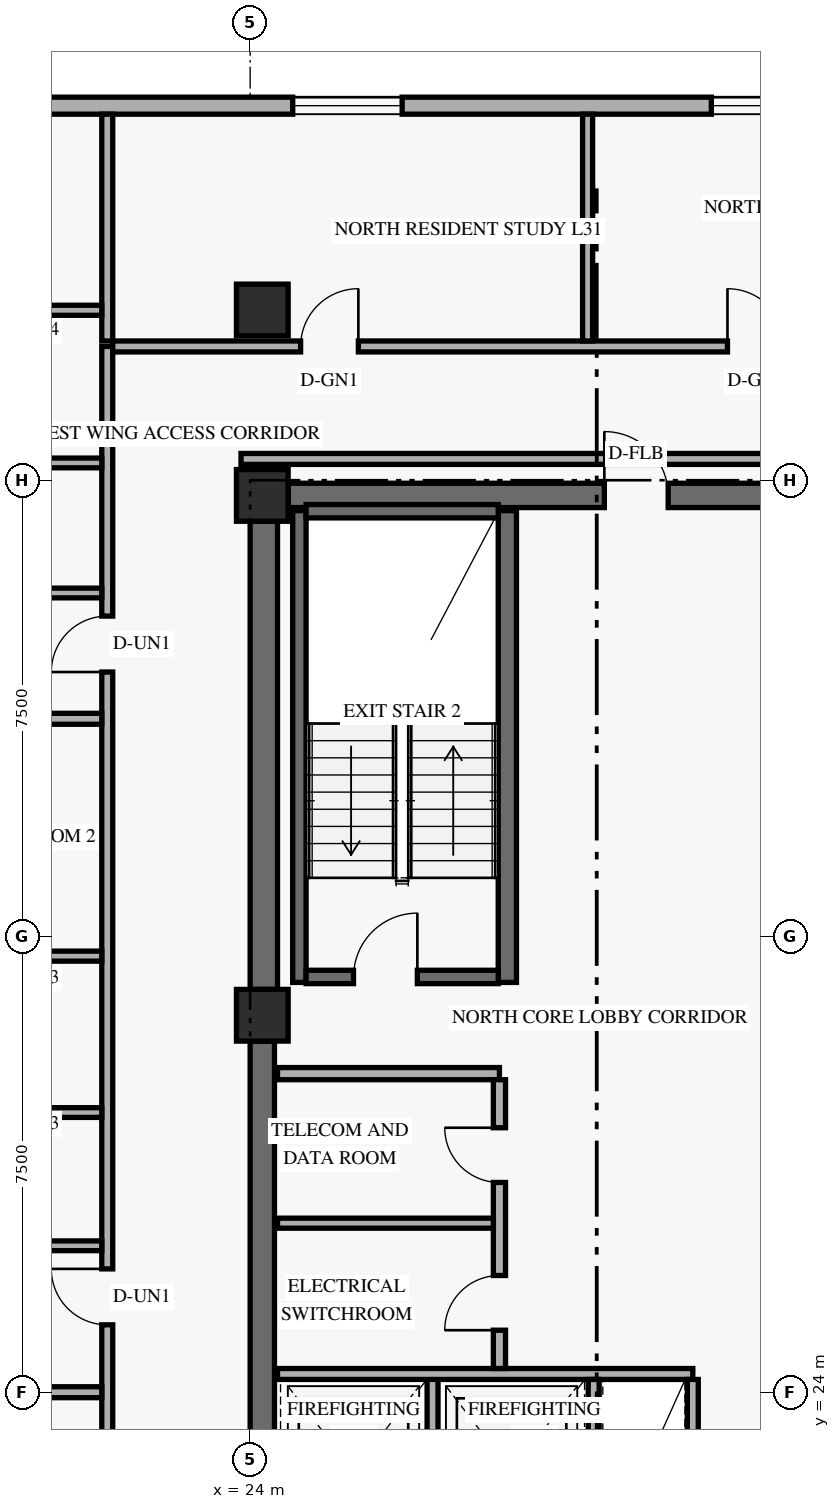
"""IFC4 building model, lengths in metres.
Left out: names, types, materials, properties, quantities, classifications, styles, units other than length and angle.
Written with IfcOpenShell. Run it as: python <this file> out.ifc"""

import sys

from ifc_helpers import new_model, si_unit, direction, frame, frame_2d, origin, origin_2d, place, context, subcontext, project, spatial, rectangle, extrude, element, fill, save


model = new_model("IFC4")
c1 = context("Model", 3, precision=1e-05, world=origin(), true_north=direction((0.0, 1.0)))
c2 = subcontext(c1, "Body", "Model", "MODEL_VIEW")
j1 = project(units=[si_unit("LENGTHUNIT", "METRE"), si_unit("PLANEANGLEUNIT", "RADIAN")], contexts=[c1])
p1 = place(None, origin())
s1 = spatial("IfcSite", under=j1, at=p1, CompositionType="ELEMENT")
p2 = place(p1, origin())
s2 = spatial("IfcBuilding", under=s1, at=p2, CompositionType="ELEMENT")
p3 = place(p2, frame((0.0, 0.0, 121.2)))
s3 = spatial("IfcBuildingStorey", under=s2, at=p3, CompositionType="ELEMENT", Elevation=121.2)
p4 = place(p3, frame((24.2, 17.975, 0.0), z_axis=(0.0, 0.0, 1.0), x_axis=(0.0, 1.0, 0.0)))
e1 = element("IfcWall", 1, at=p4, inside=s3, PredefinedType="SHEAR", context=c2, shape_type="SweptSolid", body=[
    extrude(rectangle(XDim=11.8, YDim=0.4, at=frame_2d((5.9, 0.0))), origin(), (0.0, 0.0, 1.0), 2.749),
])
p5 = place(p3, frame((24.225, 30.625, 0.0), z_axis=(0.0, 0.0, 1.0), x_axis=(0.0, 1.0, 0.0)))
e2 = element("IfcWall", 2, at=p5, inside=s3, PredefinedType="SHEAR", context=c2, shape_type="SweptSolid", body=[
    extrude(rectangle(XDim=7.7, YDim=0.45, at=frame_2d((3.85, 0.0))), origin(), (0.0, 0.0, 1.0), 2.749),
])
p6 = place(p3, frame((24.625, 38.75, 0.0), z_axis=(0.0, 0.0, 1.0), x_axis=(1.0, 0.0, 0.0)))
e3 = element("IfcWall", 3, at=p6, inside=s3, PredefinedType="SHEAR", context=c2, shape_type="SweptSolid", body=[
    extrude(rectangle(XDim=10.15, YDim=0.4, at=frame_2d((5.075, 0.0))), origin(), (0.0, 0.0, 1.0), 3.36),
])
p7 = place(p6, frame((5.2, 0.0, 0.0)))
e4 = element("IfcOpeningElement", 4, at=p7, cuts=e3, PredefinedType="OPENING", context=c2, shape_type="SweptSolid", body=[
    extrude(rectangle(XDim=1.05, YDim=2.15, at=frame_2d((0.525, 1.075))), frame((0.0, 0.21, 0.0), z_axis=(0.0, -1.0, 0.0), x_axis=(1.0, 0.0, 0.0)), (0.0, 0.0, 1.0), 0.42),
])
p8 = place(p3, frame((24.81, 30.74, 0.0), z_axis=(0.0, 0.0, 1.0), x_axis=(0.0, 1.0, 0.0)))
e5 = element("IfcWall", 5, at=p8, inside=s3, PredefinedType="SHEAR", context=c2, shape_type="SweptSolid", body=[
    extrude(rectangle(XDim=7.76, YDim=0.22, at=frame_2d((3.88, 0.0))), origin(), (0.0, 0.0, 1.0), 3.36),
])
p9 = place(p3, frame((28.23, 30.74, 0.0), z_axis=(0.0, 0.0, 1.0), x_axis=(0.0, 1.0, 0.0)))
e6 = element("IfcWall", 6, at=p9, inside=s3, PredefinedType="SHEAR", context=c2, shape_type="SweptSolid", body=[
    extrude(rectangle(XDim=7.76, YDim=0.3, at=frame_2d((3.88, 0.0))), origin(), (0.0, 0.0, 1.0), 3.36),
])
p10 = place(p3, frame((24.92, 30.83, 0.0), z_axis=(0.0, 0.0, 1.0), x_axis=(1.0, 0.0, 0.0)))
e7 = element("IfcWall", 7, at=p10, inside=s3, PredefinedType="SHEAR", context=c2, shape_type="SweptSolid", body=[
    extrude(rectangle(XDim=3.16, YDim=0.22, at=frame_2d((1.58, 0.0))), origin(), (0.0, 0.0, 1.0), 3.36),
])
p11 = place(p10, frame((0.78, 0.0, 0.0)))
e8 = element("IfcOpeningElement", 8, at=p11, cuts=e7, PredefinedType="OPENING", context=c2, shape_type="SweptSolid", body=[
    extrude(rectangle(XDim=1.05, YDim=2.15, at=frame_2d((0.525, 1.075))), frame((0.0, 0.12, 0.0), z_axis=(0.0, -1.0, 0.0), x_axis=(1.0, 0.0, 0.0)), (0.0, 0.0, 1.0), 0.24),
])
p12 = place(p3, frame((24.92, 38.49, 0.0), z_axis=(0.0, 0.0, 1.0), x_axis=(1.0, 0.0, 0.0)))
e9 = element("IfcWall", 9, at=p12, inside=s3, PredefinedType="SHEAR", context=c2, shape_type="SweptSolid", body=[
    extrude(rectangle(XDim=3.16, YDim=0.22, at=frame_2d((1.58, 0.0))), origin(), (0.0, 0.0, 1.0), 3.36),
])
for number, where, z_axis, x_axis in (
    (10, (24.2, 30.2, 0.0), (0.0, 0.0, 1.0), (1.0, 0.0, 0.0)),
    (11, (24.2, 38.75, 0.0), (0.0, 0.0, 1.0), (1.0, 0.0, 0.0)),
    (12, (24.2, 41.8, 0.0), (0.0, 0.0, 1.0), (1.0, 0.0, 0.0)),
):
    element("IfcColumn", number, at=place(p3, frame(where, z_axis=z_axis, x_axis=x_axis)), inside=s3, PredefinedType="COLUMN", context=c2, shape_type="SweptSolid", body=[
        extrude(rectangle(XDim=0.85, YDim=0.85, at=origin_2d()), origin(), (0.0, 0.0, 1.0), 3.6),
    ])
p13 = place(p3, frame((49.98, 45.16, 0.0), z_axis=(0.0, 0.0, 1.0), x_axis=(-1.0, 0.0, 0.0)))
e13 = element("IfcWall", 13, at=p13, inside=s3, PredefinedType="SOLIDWALL", context=c2, shape_type="SweptSolid", body=[
    extrude(rectangle(XDim=36.56, YDim=0.28, at=frame_2d((18.28, 0.0))), origin(), (0.0, 0.0, 1.0), 3.36),
])
p14 = place(p13, frame((31.545, 0.0, 0.85)))
e14 = element("IfcOpeningElement", 14, at=p14, cuts=e13, PredefinedType="OPENING", context=c2, shape_type="SweptSolid", body=[
    extrude(rectangle(XDim=1.8, YDim=1.6, at=frame_2d((0.9, 0.8))), frame((0.0, 0.15, 0.0), z_axis=(0.0, -1.0, 0.0), x_axis=(1.0, 0.0, 0.0)), (0.0, 0.0, 1.0), 0.3),
])
p15 = place(p13, frame((23.48, 0.0, 0.85)))
e15 = element("IfcOpeningElement", 15, at=p15, cuts=e13, PredefinedType="OPENING", context=c2, shape_type="SweptSolid", body=[
    extrude(rectangle(XDim=1.8, YDim=1.6, at=frame_2d((0.9, 0.8))), frame((0.0, 0.15, 0.0), z_axis=(0.0, -1.0, 0.0), x_axis=(1.0, 0.0, 0.0)), (0.0, 0.0, 1.0), 0.3),
])
p16 = place(p13, frame((16.595, 0.0, 0.85)))
e16 = element("IfcOpeningElement", 16, at=p16, cuts=e13, PredefinedType="OPENING", context=c2, shape_type="SweptSolid", body=[
    extrude(rectangle(XDim=1.8, YDim=1.6, at=frame_2d((0.9, 0.8))), frame((0.0, 0.15, 0.0), z_axis=(0.0, -1.0, 0.0), x_axis=(1.0, 0.0, 0.0)), (0.0, 0.0, 1.0), 0.3),
])
p17 = place(p13, frame((10.365, 0.0, 0.85)))
e17 = element("IfcOpeningElement", 17, at=p17, cuts=e13, PredefinedType="OPENING", context=c2, shape_type="SweptSolid", body=[
    extrude(rectangle(XDim=1.8, YDim=1.6, at=frame_2d((0.9, 0.8))), frame((0.0, 0.15, 0.0), z_axis=(0.0, -1.0, 0.0), x_axis=(1.0, 0.0, 0.0)), (0.0, 0.0, 1.0), 0.3),
])
p18 = place(p13, frame((4.575, 0.0, 0.85)))
e18 = element("IfcOpeningElement", 18, at=p18, cuts=e13, PredefinedType="OPENING", context=c2, shape_type="SweptSolid", body=[
    extrude(rectangle(XDim=1.8, YDim=1.6, at=frame_2d((0.9, 0.8))), frame((0.0, 0.15, 0.0), z_axis=(0.0, -1.0, 0.0), x_axis=(1.0, 0.0, 0.0)), (0.0, 0.0, 1.0), 0.3),
])
p19 = place(p13, frame((0.59, 0.0, 0.85)))
e19 = element("IfcOpeningElement", 19, at=p19, cuts=e13, PredefinedType="OPENING", context=c2, shape_type="SweptSolid", body=[
    extrude(rectangle(XDim=1.8, YDim=1.6, at=frame_2d((0.9, 0.8))), frame((0.0, 0.15, 0.0), z_axis=(0.0, -1.0, 0.0), x_axis=(1.0, 0.0, 0.0)), (0.0, 0.0, 1.0), 0.3),
])
p20 = place(p3, frame((27.0, 21.19, 0.0), z_axis=(0.0, 0.0, 1.0), x_axis=(0.0, 1.0, 0.0)))
e20 = element("IfcWall", 20, at=p20, inside=s3, PredefinedType="STANDARD", context=c2, shape_type="SweptSolid", body=[
    extrude(rectangle(XDim=3.11, YDim=0.18, at=frame_2d((1.555, 0.0))), origin(), (0.0, 0.0, 1.0), 3.36),
])
p21 = place(p3, frame((24.45, 24.3, 0.0), z_axis=(0.0, 0.0, 1.0), x_axis=(1.0, 0.0, 0.0)))
e21 = element("IfcWall", 21, at=p21, inside=s3, PredefinedType="STANDARD", context=c2, shape_type="SweptSolid", body=[
    extrude(rectangle(XDim=6.83, YDim=0.18, at=frame_2d((3.415, 0.0))), origin(), (0.0, 0.0, 1.0), 3.36),
])
for number, where, z_axis, x_axis in (
    (22, (29.65, 21.19, 0.0), (0.0, 0.0, 1.0), (0.0, 1.0, 0.0)),
    (23, (31.28, 21.19, 0.0), (0.0, 0.0, 1.0), (0.0, 1.0, 0.0)),
):
    element("IfcWall", number, at=place(p3, frame(where, z_axis=z_axis, x_axis=x_axis)), inside=s3, PredefinedType="STANDARD", context=c2, shape_type="SweptSolid", body=[
        extrude(rectangle(XDim=3.02, YDim=0.18, at=frame_2d((1.51, 0.0))), origin(), (0.0, 0.0, 1.0), 3.36),
    ])
p22 = place(p3, frame((24.45, 29.24, 0.0), z_axis=(0.0, 0.0, 1.0), x_axis=(1.0, 0.0, 0.0)))
e24 = element("IfcWall", 24, at=p22, inside=s3, PredefinedType="STANDARD", context=c2, shape_type="SweptSolid", body=[
    extrude(rectangle(XDim=3.65, YDim=0.2, at=frame_2d((1.825, 0.0))), origin(), (0.0, 0.0, 1.0), 3.36),
])
p23 = place(p3, frame((28.1, 24.39, 0.0), z_axis=(0.0, 0.0, 1.0), x_axis=(0.0, 1.0, 0.0)))
e25 = element("IfcWall", 25, at=p23, inside=s3, PredefinedType="STANDARD", context=c2, shape_type="SweptSolid", body=[
    extrude(rectangle(XDim=4.75, YDim=0.2, at=frame_2d((2.375, 0.0))), origin(), (0.0, 0.0, 1.0), 3.36),
])
p24 = place(p23, frame((0.63, 0.0, 0.0)))
e26 = element("IfcOpeningElement", 26, at=p24, cuts=e25, PredefinedType="OPENING", context=c2, shape_type="SweptSolid", body=[
    extrude(rectangle(XDim=0.9, YDim=2.1, at=frame_2d((0.45, 1.05))), frame((0.0, 0.11, 0.0), z_axis=(0.0, -1.0, 0.0), x_axis=(1.0, 0.0, 0.0)), (0.0, 0.0, 1.0), 0.22),
])
p25 = place(p23, frame((3.06, 0.0, 0.0)))
e27 = element("IfcOpeningElement", 27, at=p25, cuts=e25, PredefinedType="OPENING", context=c2, shape_type="SweptSolid", body=[
    extrude(rectangle(XDim=0.9, YDim=2.1, at=frame_2d((0.45, 1.05))), frame((0.0, 0.11, 0.0), z_axis=(0.0, -1.0, 0.0), x_axis=(1.0, 0.0, 0.0)), (0.0, 0.0, 1.0), 0.22),
])
p26 = place(p3, frame((24.45, 26.78, 0.0), z_axis=(0.0, 0.0, 1.0), x_axis=(1.0, 0.0, 0.0)))
e28 = element("IfcWall", 28, at=p26, inside=s3, PredefinedType="PARTITIONING", context=c2, shape_type="SweptSolid", body=[
    extrude(rectangle(XDim=3.55, YDim=0.165, at=frame_2d((1.775, 0.0))), origin(), (0.0, 0.0, 1.0), 3.36),
])
p27 = place(p3, frame((21.65, 6.8, 0.0), z_axis=(0.0, 0.0, 1.0), x_axis=(0.0, 1.0, 0.0)))
e29 = element("IfcWall", 29, at=p27, inside=s3, PredefinedType="STANDARD", context=c2, shape_type="SweptSolid", body=[
    extrude(rectangle(XDim=34.4, YDim=0.18, at=frame_2d((17.2, 0.0))), origin(), (0.0, 0.0, 1.0), 2.731),
])
p28 = place(p27, frame((4.472, 0.0, 0.0)))
e30 = element("IfcOpeningElement", 30, at=p28, cuts=e29, PredefinedType="OPENING", context=c2, shape_type="SweptSolid", body=[
    extrude(rectangle(XDim=0.92, YDim=2.15, at=frame_2d((0.46, 1.075))), frame((0.0, 0.1, 0.0), z_axis=(0.0, -1.0, 0.0), x_axis=(1.0, 0.0, 0.0)), (0.0, 0.0, 1.0), 0.2),
])
p29 = place(p27, frame((7.261, 0.0, 0.0)))
e31 = element("IfcOpeningElement", 31, at=p29, cuts=e29, PredefinedType="OPENING", context=c2, shape_type="SweptSolid", body=[
    extrude(rectangle(XDim=0.92, YDim=2.15, at=frame_2d((0.46, 1.075))), frame((0.0, 0.1, 0.0), z_axis=(0.0, -1.0, 0.0), x_axis=(1.0, 0.0, 0.0)), (0.0, 0.0, 1.0), 0.2),
])
p30 = place(p27, frame((18.308, 0.0, 0.0)))
e32 = element("IfcOpeningElement", 32, at=p30, cuts=e29, PredefinedType="OPENING", context=c2, shape_type="SweptSolid", body=[
    extrude(rectangle(XDim=0.92, YDim=2.15, at=frame_2d((0.46, 1.075))), frame((0.0, 0.1, 0.0), z_axis=(0.0, -1.0, 0.0), x_axis=(1.0, 0.0, 0.0)), (0.0, 0.0, 1.0), 0.2),
])
p31 = place(p27, frame((29.045, 0.0, 0.0)))
e33 = element("IfcOpeningElement", 33, at=p31, cuts=e29, PredefinedType="OPENING", context=c2, shape_type="SweptSolid", body=[
    extrude(rectangle(XDim=0.92, YDim=2.15, at=frame_2d((0.46, 1.075))), frame((0.0, 0.1, 0.0), z_axis=(0.0, -1.0, 0.0), x_axis=(1.0, 0.0, 0.0)), (0.0, 0.0, 1.0), 0.2),
])
p32 = place(p3, frame((21.74, 41.2, 0.0), z_axis=(0.0, 0.0, 1.0), x_axis=(1.0, 0.0, 0.0)))
e34 = element("IfcWall", 34, at=p32, inside=s3, PredefinedType="STANDARD", context=c2, shape_type="SweptSolid", body=[
    extrude(rectangle(XDim=13.68, YDim=0.18, at=frame_2d((6.84, 0.0))), origin(), (0.0, 0.0, 1.0), 2.731),
])
p33 = place(p32, frame((3.09, 0.0, 0.0)))
e35 = element("IfcOpeningElement", 35, at=p33, cuts=e34, PredefinedType="OPENING", context=c2, shape_type="SweptSolid", body=[
    extrude(rectangle(XDim=0.95, YDim=2.15, at=frame_2d((0.475, 1.075))), frame((0.0, 0.1, 0.0), z_axis=(0.0, -1.0, 0.0), x_axis=(1.0, 0.0, 0.0)), (0.0, 0.0, 1.0), 0.2),
])
p34 = place(p32, frame((10.11, 0.0, 0.0)))
e36 = element("IfcOpeningElement", 36, at=p34, cuts=e34, PredefinedType="OPENING", context=c2, shape_type="SweptSolid", body=[
    extrude(rectangle(XDim=0.95, YDim=2.15, at=frame_2d((0.475, 1.075))), frame((0.0, 0.1, 0.0), z_axis=(0.0, -1.0, 0.0), x_axis=(1.0, 0.0, 0.0)), (0.0, 0.0, 1.0), 0.2),
])
p35 = place(p3, frame((23.85, 39.35, 0.0), z_axis=(0.0, 0.0, 1.0), x_axis=(1.0, 0.0, 0.0)))
e37 = element("IfcWall", 37, at=p35, inside=s3, PredefinedType="STANDARD", context=c2, shape_type="SweptSolid", body=[
    extrude(rectangle(XDim=11.57, YDim=0.18, at=frame_2d((5.785, 0.0))), origin(), (0.0, 0.0, 1.0), 2.731),
])
p36 = place(p3, frame((21.65, 41.29, 0.0), z_axis=(0.0, 0.0, 1.0), x_axis=(0.0, 1.0, 0.0)))
e38 = element("IfcWall", 38, at=p36, inside=s3, PredefinedType="PARTITIONING", context=c2, shape_type="SweptSolid", body=[
    extrude(rectangle(XDim=3.73, YDim=0.18, at=frame_2d((1.865, 0.0))), origin(), (0.0, 0.0, 1.0), 2.809),
])
p37 = place(p3, frame((10.08, 24.0, 0.0), z_axis=(0.0, 0.0, 1.0), x_axis=(1.0, 0.0, 0.0)))
e39 = element("IfcWall", 39, at=p37, inside=s3, PredefinedType="PARTITIONING", context=c2, shape_type="SweptSolid", body=[
    extrude(rectangle(XDim=11.48, YDim=0.18, at=frame_2d((5.74, 0.0))), origin(), (0.0, 0.0, 1.0), 2.731),
])
p38 = place(p3, frame((10.08, 31.172, 0.0), z_axis=(0.0, 0.0, 1.0), x_axis=(1.0, 0.0, 0.0)))
e40 = element("IfcWall", 40, at=p38, inside=s3, PredefinedType="PARTITIONING", context=c2, shape_type="SweptSolid", body=[
    extrude(rectangle(XDim=11.48, YDim=0.165, at=frame_2d((5.74, 0.0))), origin(), (0.0, 0.0, 1.0), 2.731),
])
p39 = place(p38, frame((1.75, 0.0, 0.0)))
e41 = element("IfcOpeningElement", 41, at=p39, cuts=e40, PredefinedType="OPENING", context=c2, shape_type="SweptSolid", body=[
    extrude(rectangle(XDim=0.88, YDim=2.14, at=frame_2d((0.44, 1.07))), frame((0.0, 0.093, 0.0), z_axis=(0.0, -1.0, 0.0), x_axis=(1.0, 0.0, 0.0)), (0.0, 0.0, 1.0), 0.185),
])
p40 = place(p38, frame((4.87, 0.0, 0.0)))
e42 = element("IfcOpeningElement", 42, at=p40, cuts=e40, PredefinedType="OPENING", context=c2, shape_type="SweptSolid", body=[
    extrude(rectangle(XDim=0.88, YDim=2.14, at=frame_2d((0.44, 1.07))), frame((0.0, 0.093, 0.0), z_axis=(0.0, -1.0, 0.0), x_axis=(1.0, 0.0, 0.0)), (0.0, 0.0, 1.0), 0.185),
])
p41 = place(p3, frame((16.03, 26.408, 0.0), z_axis=(0.0, 0.0, 1.0), x_axis=(1.0, 0.0, 0.0)))
e43 = element("IfcWall", 43, at=p41, inside=s3, PredefinedType="PLUMBINGWALL", context=c2, shape_type="SweptSolid", body=[
    extrude(rectangle(XDim=5.53, YDim=0.16, at=frame_2d((2.765, 0.0))), origin(), (0.0, 0.0, 1.0), 2.731),
])
p42 = place(p3, frame((16.19, 28.6, 0.0), z_axis=(0.0, 0.0, 1.0), x_axis=(1.0, 0.0, 0.0)))
e44 = element("IfcWall", 44, at=p42, inside=s3, PredefinedType="PLUMBINGWALL", context=c2, shape_type="SweptSolid", body=[
    extrude(rectangle(XDim=5.37, YDim=0.16, at=frame_2d((2.685, 0.0))), origin(), (0.0, 0.0, 1.0), 2.731),
])
p43 = place(p3, frame((10.08, 35.076, 0.0), z_axis=(0.0, 0.0, 1.0), x_axis=(1.0, 0.0, 0.0)))
e45 = element("IfcWall", 45, at=p43, inside=s3, PredefinedType="PARTITIONING", context=c2, shape_type="SweptSolid", body=[
    extrude(rectangle(XDim=11.48, YDim=0.18, at=frame_2d((5.74, 0.0))), origin(), (0.0, 0.0, 1.0), 2.731),
])
p44 = place(p3, frame((10.099, 41.795, 0.0), z_axis=(0.0, 0.0, 1.0), x_axis=(1.0, 0.0, 0.0)))
e46 = element("IfcWall", 46, at=p44, inside=s3, PredefinedType="PARTITIONING", context=c2, shape_type="SweptSolid", body=[
    extrude(rectangle(XDim=11.461, YDim=0.165, at=frame_2d((5.73, 0.0))), origin(), (0.0, 0.0, 1.0), 2.809),
])
p45 = place(p44, frame((2.391, 0.0, 0.0)))
e47 = element("IfcOpeningElement", 47, at=p45, cuts=e46, PredefinedType="OPENING", context=c2, shape_type="SweptSolid", body=[
    extrude(rectangle(XDim=0.9, YDim=2.14, at=frame_2d((0.45, 1.07))), frame((0.0, 0.093, 0.0), z_axis=(0.0, -1.0, 0.0), x_axis=(1.0, 0.0, 0.0)), (0.0, 0.0, 1.0), 0.185),
])
p46 = place(p3, frame((16.03, 37.145, 0.0), z_axis=(0.0, 0.0, 1.0), x_axis=(1.0, 0.0, 0.0)))
e48 = element("IfcWall", 48, at=p46, inside=s3, PredefinedType="PLUMBINGWALL", context=c2, shape_type="SweptSolid", body=[
    extrude(rectangle(XDim=5.53, YDim=0.16, at=frame_2d((2.765, 0.0))), origin(), (0.0, 0.0, 1.0), 2.731),
])
p47 = place(p3, frame((16.19, 39.284, 0.0), z_axis=(0.0, 0.0, 1.0), x_axis=(1.0, 0.0, 0.0)))
e49 = element("IfcWall", 49, at=p47, inside=s3, PredefinedType="PLUMBINGWALL", context=c2, shape_type="SweptSolid", body=[
    extrude(rectangle(XDim=5.37, YDim=0.16, at=frame_2d((2.685, 0.0))), origin(), (0.0, 0.0, 1.0), 2.731),
])
p48 = place(p3, frame((29.55, 41.29, 0.0), z_axis=(0.0, 0.0, 1.0), x_axis=(0.0, 1.0, 0.0)))
e50 = element("IfcWall", 50, at=p48, inside=s3, PredefinedType="PARTITIONING", context=c2, shape_type="SweptSolid", body=[
    extrude(rectangle(XDim=3.73, YDim=0.165, at=frame_2d((1.865, 0.0))), origin(), (0.0, 0.0, 1.0), 2.809),
])
p49 = place(p15, origin())
e51 = element("IfcWindow", 51, at=p49, inside=s3, PartitioningType="SINGLE_PANEL", PredefinedType="WINDOW", context=c2, shape_type="SweptSolid", body=[
    extrude(rectangle(XDim=1.8, YDim=1.6, at=frame_2d((0.9, 0.8))), frame((0.0, 0.03, 0.0), z_axis=(0.0, -1.0, 0.0), x_axis=(1.0, 0.0, 0.0)), (0.0, 0.0, 1.0), 0.06),
])
fill(e15, e51)
p50 = place(p16, origin())
e52 = element("IfcWindow", 52, at=p50, inside=s3, PartitioningType="SINGLE_PANEL", PredefinedType="WINDOW", context=c2, shape_type="SweptSolid", body=[
    extrude(rectangle(XDim=1.8, YDim=1.6, at=frame_2d((0.9, 0.8))), frame((0.0, 0.03, 0.0), z_axis=(0.0, -1.0, 0.0), x_axis=(1.0, 0.0, 0.0)), (0.0, 0.0, 1.0), 0.06),
])
fill(e16, e52)
p51 = place(p11, origin())
e53 = element("IfcDoor", 53, at=p51, inside=s3, OperationType="SINGLE_SWING_RIGHT", PredefinedType="DOOR", context=c2, shape_type="SweptSolid", body=[
    extrude(rectangle(XDim=1.05, YDim=2.15, at=frame_2d((0.525, 1.075))), frame((0.0, 0.025, 0.0), z_axis=(0.0, -1.0, 0.0), x_axis=(1.0, 0.0, 0.0)), (0.0, 0.0, 1.0), 0.05),
])
fill(e8, e53)
p52 = place(p24, origin())
e54 = element("IfcDoor", 54, at=p52, inside=s3, OperationType="SINGLE_SWING_LEFT", PredefinedType="DOOR", context=c2, shape_type="SweptSolid", body=[
    extrude(rectangle(XDim=0.9, YDim=2.1, at=frame_2d((0.45, 1.05))), frame((0.0, 0.025, 0.0), z_axis=(0.0, -1.0, 0.0), x_axis=(1.0, 0.0, 0.0)), (0.0, 0.0, 1.0), 0.05),
])
fill(e26, e54)
p53 = place(p25, origin())
e55 = element("IfcDoor", 55, at=p53, inside=s3, OperationType="SINGLE_SWING_RIGHT", PredefinedType="DOOR", context=c2, shape_type="SweptSolid", body=[
    extrude(rectangle(XDim=0.9, YDim=2.1, at=frame_2d((0.45, 1.05))), frame((0.0, 0.025, 0.0), z_axis=(0.0, -1.0, 0.0), x_axis=(1.0, 0.0, 0.0)), (0.0, 0.0, 1.0), 0.05),
])
fill(e27, e55)
p54 = place(p7, frame((1.05, 0.0, 0.0), z_axis=(0.0, 0.0, 1.0), x_axis=(-1.0, 0.0, 0.0)))
e56 = element("IfcDoor", 56, at=p54, inside=s3, OperationType="SINGLE_SWING_RIGHT", PredefinedType="DOOR", context=c2, shape_type="SweptSolid", body=[
    extrude(rectangle(XDim=1.05, YDim=2.15, at=frame_2d((0.525, 1.075))), frame((0.0, 0.025, 0.0), z_axis=(0.0, -1.0, 0.0), x_axis=(1.0, 0.0, 0.0)), (0.0, 0.0, 1.0), 0.05),
])
fill(e4, e56)
p55 = place(p30, origin())
e57 = element("IfcDoor", 57, at=p55, inside=s3, OperationType="SINGLE_SWING_RIGHT", PredefinedType="DOOR", context=c2, shape_type="SweptSolid", body=[
    extrude(rectangle(XDim=0.92, YDim=2.15, at=frame_2d((0.46, 1.075))), frame((0.0, 0.025, 0.0), z_axis=(0.0, -1.0, 0.0), x_axis=(1.0, 0.0, 0.0)), (0.0, 0.0, 1.0), 0.05),
])
fill(e32, e57)
p56 = place(p31, origin())
e58 = element("IfcDoor", 58, at=p56, inside=s3, OperationType="SINGLE_SWING_LEFT", PredefinedType="DOOR", context=c2, shape_type="SweptSolid", body=[
    extrude(rectangle(XDim=0.92, YDim=2.15, at=frame_2d((0.46, 1.075))), frame((0.0, 0.025, 0.0), z_axis=(0.0, -1.0, 0.0), x_axis=(1.0, 0.0, 0.0)), (0.0, 0.0, 1.0), 0.05),
])
fill(e33, e58)
p57 = place(p33, origin())
e59 = element("IfcDoor", 59, at=p57, inside=s3, OperationType="SINGLE_SWING_RIGHT", PredefinedType="DOOR", context=c2, shape_type="SweptSolid", body=[
    extrude(rectangle(XDim=0.95, YDim=2.15, at=frame_2d((0.475, 1.075))), frame((0.0, 0.025, 0.0), z_axis=(0.0, -1.0, 0.0), x_axis=(1.0, 0.0, 0.0)), (0.0, 0.0, 1.0), 0.05),
])
fill(e35, e59)
p58 = place(p34, origin())
e60 = element("IfcDoor", 60, at=p58, inside=s3, OperationType="SINGLE_SWING_LEFT", PredefinedType="DOOR", context=c2, shape_type="SweptSolid", body=[
    extrude(rectangle(XDim=0.95, YDim=2.15, at=frame_2d((0.475, 1.075))), frame((0.0, 0.025, 0.0), z_axis=(0.0, -1.0, 0.0), x_axis=(1.0, 0.0, 0.0)), (0.0, 0.0, 1.0), 0.05),
])
fill(e36, e60)
save(model, sys.argv[1])
